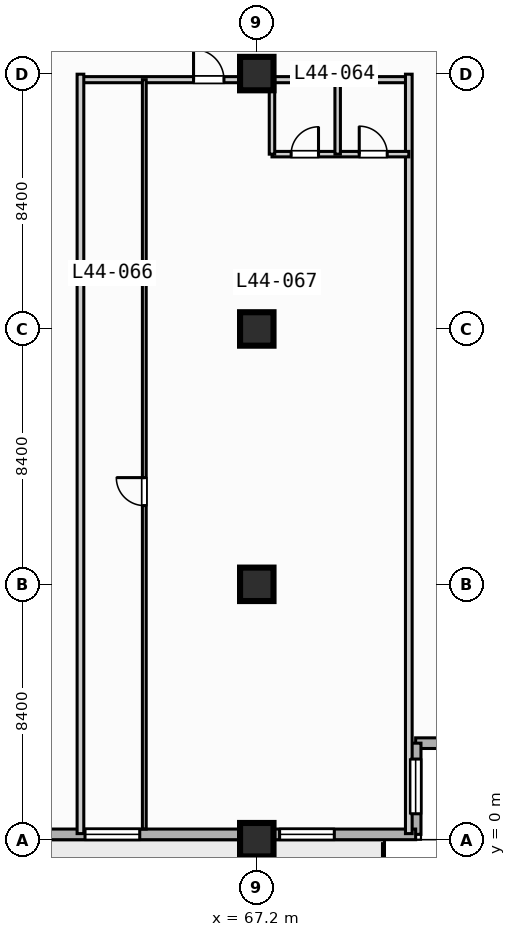
"""IFC4 building model, lengths in metres.
Left out: names, types, materials, properties, quantities, classifications, styles, units other than length and angle.
Written with IfcOpenShell. Run it as: python <this file> out.ifc"""

import sys

from ifc_helpers import new_model, si_unit, direction, frame, frame_2d, origin, origin_2d, place, context, subcontext, project, spatial, rectangle, extrude, element, fill, save


model = new_model("IFC4")
c1 = context("Model", 3, precision=1e-05, world=origin(), true_north=direction((0.0, 1.0)))
c2 = subcontext(c1, "Body", "Model", "MODEL_VIEW")
j1 = project(units=[si_unit("LENGTHUNIT", "METRE"), si_unit("PLANEANGLEUNIT", "RADIAN")], contexts=[c1])
p1 = place(None, origin())
s1 = spatial("IfcSite", under=j1, at=p1, CompositionType="ELEMENT")
p2 = place(p1, origin())
s2 = spatial("IfcBuilding", under=s1, at=p2, CompositionType="ELEMENT")
p3 = place(p2, frame((0.0, 0.0, 182.8)))
s3 = spatial("IfcBuildingStorey", under=s2, at=p3, CompositionType="ELEMENT", Elevation=182.8)
for number, where, z_axis, x_axis in (
    (1, (67.2, 0.0, 0.0), (0.0, 0.0, 1.0), (1.0, 0.0, 0.0)),
    (2, (67.2, 8.4, 0.0), (0.0, 0.0, 1.0), (1.0, 0.0, 0.0)),
    (3, (67.2, 16.8, 0.0), (0.0, 0.0, 1.0), (1.0, 0.0, 0.0)),
    (4, (67.2, 25.2, 0.0), (0.0, 0.0, 1.0), (1.0, 0.0, 0.0)),
):
    element("IfcColumn", number, at=place(p3, frame(where, z_axis=z_axis, x_axis=x_axis)), inside=s3, PredefinedType="COLUMN", context=c2, shape_type="SweptSolid", body=[
        extrude(rectangle(XDim=1.1, YDim=1.1, at=origin_2d()), origin(), (0.0, 0.0, 1.0), 3.7),
    ])
p4 = place(p3, frame((75.425, 3.175, 0.0), z_axis=(0.0, 0.0, 1.0), x_axis=(-1.0, 0.0, 0.0)))
e5 = element("IfcWall", 5, at=p4, inside=s3, PredefinedType="STANDARD", context=c2, shape_type="SweptSolid", body=[
    extrude(rectangle(XDim=3.0, YDim=0.35, at=frame_2d((1.5, 0.0))), origin(), (0.0, 0.0, 1.0), 3.47),
])
p5 = place(p3, frame((72.425, 3.175, 0.0), z_axis=(0.0, 0.0, 1.0), x_axis=(0.0, -1.0, 0.0)))
e6 = element("IfcWall", 6, at=p5, inside=s3, PredefinedType="STANDARD", context=c2, shape_type="SweptSolid", body=[
    extrude(rectangle(XDim=3.0, YDim=0.35, at=frame_2d((1.5, 0.0))), origin(), (0.0, 0.0, 1.0), 3.47),
])
p6 = place(p5, frame((0.522, 0.0, 0.85)))
e7 = element("IfcOpeningElement", 7, at=p6, cuts=e6, PredefinedType="OPENING", context=c2, shape_type="SweptSolid", body=[
    extrude(rectangle(XDim=1.8, YDim=1.8, at=frame_2d((0.9, 0.9))), frame((0.0, 0.185, 0.0), z_axis=(0.0, -1.0, 0.0), x_axis=(1.0, 0.0, 0.0)), (0.0, 0.0, 1.0), 0.37),
])
p7 = place(p3, frame((72.425, 0.175, 0.0), z_axis=(0.0, 0.0, 1.0), x_axis=(-1.0, 0.0, 0.0)))
e8 = element("IfcWall", 8, at=p7, inside=s3, PredefinedType="STANDARD", context=c2, shape_type="SweptSolid", body=[
    extrude(rectangle(XDim=69.25, YDim=0.35, at=frame_2d((34.625, 0.0))), origin(), (0.0, 0.0, 1.0), 3.47),
])
p8 = place(p7, frame((50.725, 0.0, 0.0)))
e9 = element("IfcOpeningElement", 9, at=p8, cuts=e8, PredefinedType="OPENING", context=c2, shape_type="SweptSolid", body=[
    extrude(rectangle(XDim=1.4, YDim=2.2, at=frame_2d((0.7, 1.1))), frame((0.0, 0.185, 0.0), z_axis=(0.0, -1.0, 0.0), x_axis=(1.0, 0.0, 0.0)), (0.0, 0.0, 1.0), 0.37),
])
p9 = place(p7, frame((58.625, 0.0, 0.85)))
e10 = element("IfcOpeningElement", 10, at=p9, cuts=e8, PredefinedType="OPENING", context=c2, shape_type="SweptSolid", body=[
    extrude(rectangle(XDim=2.4, YDim=1.95, at=frame_2d((1.2, 0.975))), frame((0.0, 0.185, 0.0), z_axis=(0.0, -1.0, 0.0), x_axis=(1.0, 0.0, 0.0)), (0.0, 0.0, 1.0), 0.37),
])
p10 = place(p7, frame((41.825, 0.0, 0.85)))
e11 = element("IfcOpeningElement", 11, at=p10, cuts=e8, PredefinedType="OPENING", context=c2, shape_type="SweptSolid", body=[
    extrude(rectangle(XDim=2.4, YDim=1.95, at=frame_2d((1.2, 0.975))), frame((0.0, 0.185, 0.0), z_axis=(0.0, -1.0, 0.0), x_axis=(1.0, 0.0, 0.0)), (0.0, 0.0, 1.0), 0.37),
])
p11 = place(p7, frame((33.725, 0.0, 0.85)))
e12 = element("IfcOpeningElement", 12, at=p11, cuts=e8, PredefinedType="OPENING", context=c2, shape_type="SweptSolid", body=[
    extrude(rectangle(XDim=1.8, YDim=1.8, at=frame_2d((0.9, 0.9))), frame((0.0, 0.185, 0.0), z_axis=(0.0, -1.0, 0.0), x_axis=(1.0, 0.0, 0.0)), (0.0, 0.0, 1.0), 0.37),
])
p12 = place(p7, frame((25.025, 0.0, 0.85)))
e13 = element("IfcOpeningElement", 13, at=p12, cuts=e8, PredefinedType="OPENING", context=c2, shape_type="SweptSolid", body=[
    extrude(rectangle(XDim=2.4, YDim=1.95, at=frame_2d((1.2, 0.975))), frame((0.0, 0.185, 0.0), z_axis=(0.0, -1.0, 0.0), x_axis=(1.0, 0.0, 0.0)), (0.0, 0.0, 1.0), 0.37),
])
p13 = place(p7, frame((67.075, 0.0, 0.85)))
e14 = element("IfcOpeningElement", 14, at=p13, cuts=e8, PredefinedType="OPENING", context=c2, shape_type="SweptSolid", body=[
    extrude(rectangle(XDim=1.8, YDim=1.8, at=frame_2d((0.9, 0.9))), frame((0.0, 0.185, 0.0), z_axis=(0.0, -1.0, 0.0), x_axis=(1.0, 0.0, 0.0)), (0.0, 0.0, 1.0), 0.37),
])
p14 = place(p7, frame((56.39, 0.0, 0.85)))
e15 = element("IfcOpeningElement", 15, at=p14, cuts=e8, PredefinedType="OPENING", context=c2, shape_type="SweptSolid", body=[
    extrude(rectangle(XDim=0.72, YDim=1.8, at=frame_2d((0.36, 0.9))), frame((0.0, 0.185, 0.0), z_axis=(0.0, -1.0, 0.0), x_axis=(1.0, 0.0, 0.0)), (0.0, 0.0, 1.0), 0.37),
])
p15 = place(p7, frame((9.075, 0.0, 0.85)))
e16 = element("IfcOpeningElement", 16, at=p15, cuts=e8, PredefinedType="OPENING", context=c2, shape_type="SweptSolid", body=[
    extrude(rectangle(XDim=1.8, YDim=1.8, at=frame_2d((0.9, 0.9))), frame((0.0, 0.185, 0.0), z_axis=(0.0, -1.0, 0.0), x_axis=(1.0, 0.0, 0.0)), (0.0, 0.0, 1.0), 0.37),
])
p16 = place(p7, frame((2.675, 0.0, 0.85)))
e17 = element("IfcOpeningElement", 17, at=p16, cuts=e8, PredefinedType="OPENING", context=c2, shape_type="SweptSolid", body=[
    extrude(rectangle(XDim=1.8, YDim=1.8, at=frame_2d((0.9, 0.9))), frame((0.0, 0.185, 0.0), z_axis=(0.0, -1.0, 0.0), x_axis=(1.0, 0.0, 0.0)), (0.0, 0.0, 1.0), 0.37),
])
p17 = place(p3, frame((61.4, 25.0, 0.0), z_axis=(0.0, 0.0, 1.0), x_axis=(1.0, 0.0, 0.0)))
e18 = element("IfcWall", 18, at=p17, inside=s3, PredefinedType="PARTITIONING", context=c2, shape_type="SweptSolid", body=[
    extrude(rectangle(XDim=10.8, YDim=0.2, at=frame_2d((5.4, 0.0))), origin(), (0.0, 0.0, 1.0), 2.82),
])
p18 = place(p17, frame((3.72, 0.0, 0.0)))
e19 = element("IfcOpeningElement", 19, at=p18, cuts=e18, PredefinedType="OPENING", context=c2, shape_type="SweptSolid", body=[
    extrude(rectangle(XDim=1.0, YDim=2.15, at=frame_2d((0.5, 1.075))), frame((0.0, 0.11, 0.0), z_axis=(0.0, -1.0, 0.0), x_axis=(1.0, 0.0, 0.0)), (0.0, 0.0, 1.0), 0.22),
])
for number, where, z_axis, x_axis in (
    (20, (61.4, 0.2, 0.0), (0.0, 0.0, 1.0), (0.0, 1.0, 0.0)),
    (21, (72.2, 0.2, 0.0), (0.0, 0.0, 1.0), (0.0, 1.0, 0.0)),
):
    element("IfcWall", number, at=place(p3, frame(where, z_axis=z_axis, x_axis=x_axis)), inside=s3, PredefinedType="PARTITIONING", context=c2, shape_type="SweptSolid", body=[
        extrude(rectangle(XDim=24.98, YDim=0.22, at=frame_2d((12.49, 0.0))), origin(), (0.0, 0.0, 1.0), 3.47),
    ])
p19 = place(p3, frame((67.7, 22.55, 0.0), z_axis=(0.0, 0.0, 1.0), x_axis=(1.0, 0.0, 0.0)))
e22 = element("IfcWall", 22, at=p19, inside=s3, PredefinedType="PLUMBINGWALL", context=c2, shape_type="SweptSolid", body=[
    extrude(rectangle(XDim=4.5, YDim=0.18, at=frame_2d((2.25, 0.0))), origin(), (0.0, 0.0, 1.0), 3.47),
])
p20 = place(p19, frame((0.63, 0.0, 0.0)))
e23 = element("IfcOpeningElement", 23, at=p20, cuts=e22, PredefinedType="OPENING", context=c2, shape_type="SweptSolid", body=[
    extrude(rectangle(XDim=0.9, YDim=2.1, at=frame_2d((0.45, 1.05))), frame((0.0, 0.1, 0.0), z_axis=(0.0, -1.0, 0.0), x_axis=(1.0, 0.0, 0.0)), (0.0, 0.0, 1.0), 0.2),
])
p21 = place(p19, frame((2.87, 0.0, 0.0)))
e24 = element("IfcOpeningElement", 24, at=p21, cuts=e22, PredefinedType="OPENING", context=c2, shape_type="SweptSolid", body=[
    extrude(rectangle(XDim=0.92, YDim=2.1, at=frame_2d((0.46, 1.05))), frame((0.0, 0.1, 0.0), z_axis=(0.0, -1.0, 0.0), x_axis=(1.0, 0.0, 0.0)), (0.0, 0.0, 1.0), 0.2),
])
for number, where, z_axis, x_axis in (
    (25, (67.7, 22.55, 0.0), (0.0, 0.0, 1.0), (0.0, 1.0, 0.0)),
    (26, (69.86, 22.55, 0.0), (0.0, 0.0, 1.0), (0.0, 1.0, 0.0)),
):
    element("IfcWall", number, at=place(p3, frame(where, z_axis=z_axis, x_axis=x_axis)), inside=s3, PredefinedType="PLUMBINGWALL", context=c2, shape_type="SweptSolid", body=[
        extrude(rectangle(XDim=2.45, YDim=0.18, at=frame_2d((1.225, 0.0))), origin(), (0.0, 0.0, 1.0), 3.47),
    ])
p22 = place(p3, frame((63.5, 0.35, 0.0), z_axis=(0.0, 0.0, 1.0), x_axis=(0.0, 1.0, 0.0)))
e27 = element("IfcWall", 27, at=p22, inside=s3, PredefinedType="PARTITIONING", context=c2, shape_type="SweptSolid", body=[
    extrude(rectangle(XDim=24.65, YDim=0.125, at=frame_2d((12.325, 0.0))), origin(), (0.0, 0.0, 1.0), 3.47),
])
p23 = place(p22, frame((10.64, 0.0, 0.0)))
e28 = element("IfcOpeningElement", 28, at=p23, cuts=e27, PredefinedType="OPENING", context=c2, shape_type="SweptSolid", body=[
    extrude(rectangle(XDim=0.92, YDim=2.1, at=frame_2d((0.46, 1.05))), frame((0.0, 0.073, 0.0), z_axis=(0.0, -1.0, 0.0), x_axis=(1.0, 0.0, 0.0)), (0.0, 0.0, 1.0), 0.145),
])
p24 = place(p6, origin())
e29 = element("IfcWindow", 29, at=p24, inside=s3, PartitioningType="SINGLE_PANEL", PredefinedType="WINDOW", context=c2, shape_type="SweptSolid", body=[
    extrude(rectangle(XDim=1.8, YDim=1.8, at=frame_2d((0.9, 0.9))), frame((0.0, 0.03, 0.0), z_axis=(0.0, -1.0, 0.0), x_axis=(1.0, 0.0, 0.0)), (0.0, 0.0, 1.0), 0.06),
])
fill(e7, e29)
p25 = place(p15, origin())
e30 = element("IfcWindow", 30, at=p25, inside=s3, PartitioningType="SINGLE_PANEL", PredefinedType="WINDOW", context=c2, shape_type="SweptSolid", body=[
    extrude(rectangle(XDim=1.8, YDim=1.8, at=frame_2d((0.9, 0.9))), frame((0.0, 0.03, 0.0), z_axis=(0.0, -1.0, 0.0), x_axis=(1.0, 0.0, 0.0)), (0.0, 0.0, 1.0), 0.06),
])
fill(e16, e30)
p26 = place(p16, origin())
e31 = element("IfcWindow", 31, at=p26, inside=s3, PartitioningType="SINGLE_PANEL", PredefinedType="WINDOW", context=c2, shape_type="SweptSolid", body=[
    extrude(rectangle(XDim=1.8, YDim=1.8, at=frame_2d((0.9, 0.9))), frame((0.0, 0.03, 0.0), z_axis=(0.0, -1.0, 0.0), x_axis=(1.0, 0.0, 0.0)), (0.0, 0.0, 1.0), 0.06),
])
fill(e17, e31)
p27 = place(p18, origin())
e32 = element("IfcDoor", 32, at=p27, inside=s3, OperationType="SINGLE_SWING_LEFT", PredefinedType="DOOR", context=c2, shape_type="SweptSolid", body=[
    extrude(rectangle(XDim=1.0, YDim=2.15, at=frame_2d((0.5, 1.075))), frame((0.0, 0.025, 0.0), z_axis=(0.0, -1.0, 0.0), x_axis=(1.0, 0.0, 0.0)), (0.0, 0.0, 1.0), 0.05),
])
fill(e19, e32)
p28 = place(p20, origin())
e33 = element("IfcDoor", 33, at=p28, inside=s3, OperationType="SINGLE_SWING_RIGHT", PredefinedType="DOOR", context=c2, shape_type="SweptSolid", body=[
    extrude(rectangle(XDim=0.9, YDim=2.1, at=frame_2d((0.45, 1.05))), frame((0.0, 0.025, 0.0), z_axis=(0.0, -1.0, 0.0), x_axis=(1.0, 0.0, 0.0)), (0.0, 0.0, 1.0), 0.05),
])
fill(e23, e33)
p29 = place(p21, origin())
e34 = element("IfcDoor", 34, at=p29, inside=s3, OperationType="SINGLE_SWING_LEFT", PredefinedType="DOOR", context=c2, shape_type="SweptSolid", body=[
    extrude(rectangle(XDim=0.92, YDim=2.1, at=frame_2d((0.46, 1.05))), frame((0.0, 0.025, 0.0), z_axis=(0.0, -1.0, 0.0), x_axis=(1.0, 0.0, 0.0)), (0.0, 0.0, 1.0), 0.05),
])
fill(e24, e34)
p30 = place(p23, origin())
e35 = element("IfcDoor", 35, at=p30, inside=s3, OperationType="SINGLE_SWING_RIGHT", PredefinedType="DOOR", context=c2, shape_type="SweptSolid", body=[
    extrude(rectangle(XDim=0.92, YDim=2.1, at=frame_2d((0.46, 1.05))), frame((0.0, 0.025, 0.0), z_axis=(0.0, -1.0, 0.0), x_axis=(1.0, 0.0, 0.0)), (0.0, 0.0, 1.0), 0.05),
])
fill(e28, e35)
save(model, sys.argv[1])
